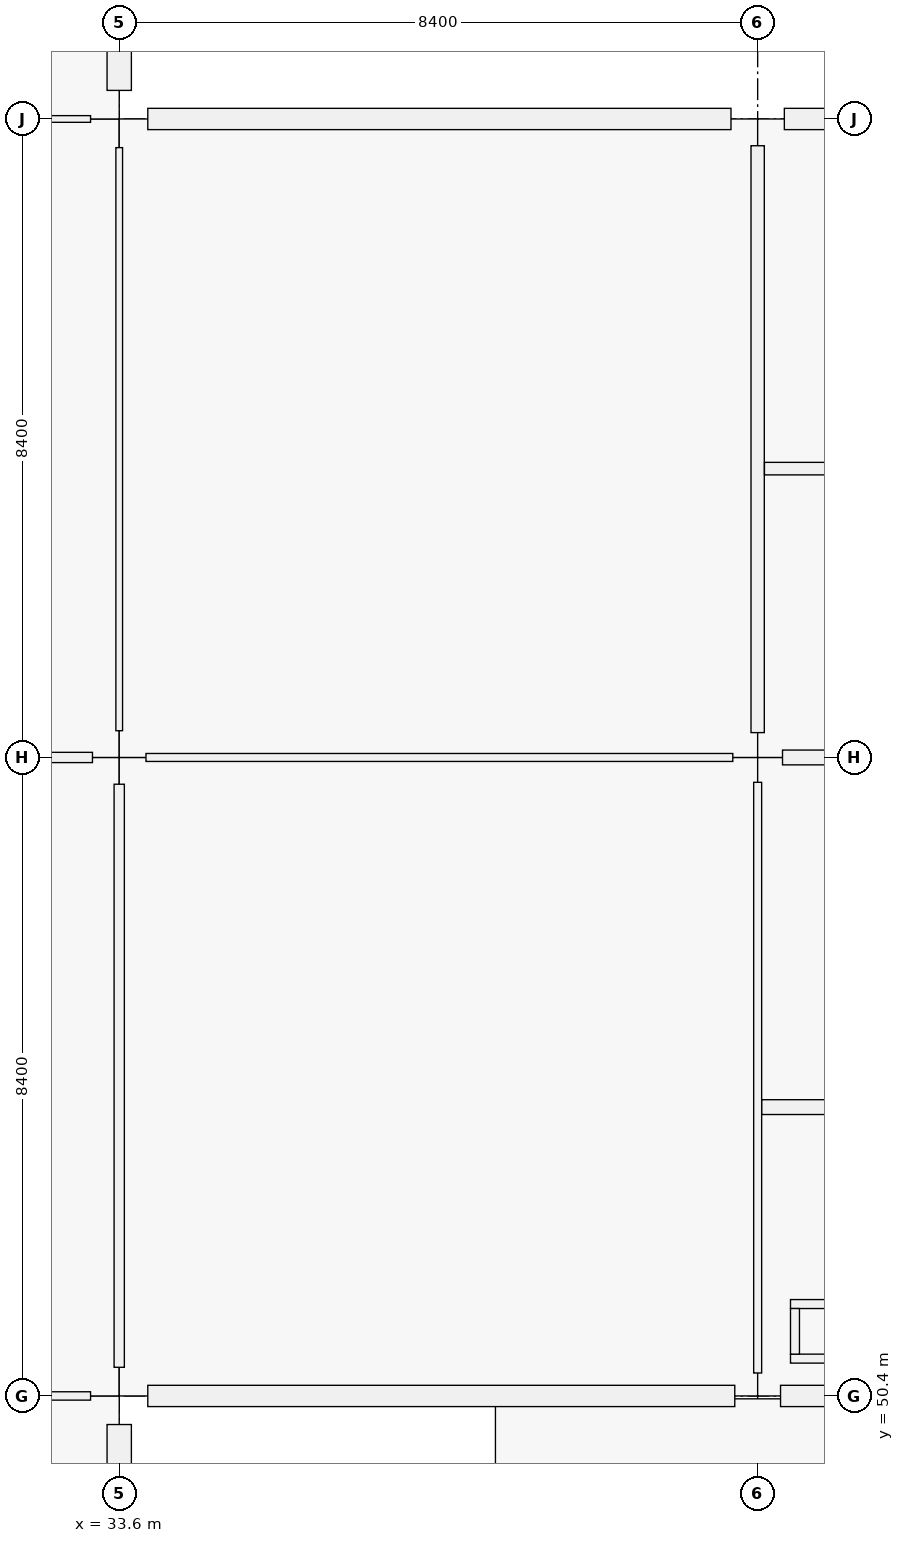
"""IFC4 building model, lengths in metres.
Left out: names, types, materials, properties, quantities, classifications, styles, units other than length and angle.
Written with IfcOpenShell. Run it as: python <this file> out.ifc"""

import sys

from ifc_helpers import new_model, si_unit, direction, frame, frame_2d, origin, origin_2d, place, context, subcontext, project, spatial, rectangle, extrude, element, fill, save


model = new_model("IFC4")
c1 = context("Model", 3, precision=1e-05, world=origin(), true_north=direction((0.0, 1.0)))
c2 = subcontext(c1, "Body", "Model", "MODEL_VIEW")
j1 = project(units=[si_unit("LENGTHUNIT", "METRE"), si_unit("PLANEANGLEUNIT", "RADIAN")], contexts=[c1])
p1 = place(None, origin())
s1 = spatial("IfcSite", under=j1, at=p1, CompositionType="ELEMENT")
p2 = place(p1, origin())
s2 = spatial("IfcBuilding", under=s1, at=p2, CompositionType="ELEMENT")
p3 = place(p2, frame((0.0, 0.0, 10.26)))
s3 = spatial("IfcBuildingStorey", under=s2, at=p3, CompositionType="ELEMENT", Elevation=10.26)
p4 = place(p3, frame((33.6, 50.4, 0.0), z_axis=(0.0, 0.0, 1.0), x_axis=(1.0, 0.0, 0.0)))
e1 = element("IfcColumn", 1, at=p4, inside=s3, PredefinedType="COLUMN", context=c2, shape_type="SweptSolid", body=[
    extrude(rectangle(XDim=0.75, YDim=0.75, at=origin_2d()), origin(), (0.0, 0.0, 1.0), 4.5),
])
p5 = place(p3, frame((33.6, 58.8, 0.0), z_axis=(0.0, 0.0, 1.0), x_axis=(1.0, 0.0, 0.0)))
e2 = element("IfcColumn", 2, at=p5, inside=s3, PredefinedType="COLUMN", context=c2, shape_type="SweptSolid", body=[
    extrude(rectangle(XDim=0.7, YDim=0.7, at=origin_2d()), origin(), (0.0, 0.0, 1.0), 4.5),
])
p6 = place(p3, frame((33.6, 67.2, 0.0), z_axis=(0.0, 0.0, 1.0), x_axis=(1.0, 0.0, 0.0)))
e3 = element("IfcColumn", 3, at=p6, inside=s3, PredefinedType="COLUMN", context=c2, shape_type="SweptSolid", body=[
    extrude(rectangle(XDim=0.75, YDim=0.75, at=origin_2d()), origin(), (0.0, 0.0, 1.0), 4.5),
])
p7 = place(p3, frame((42.0, 50.4, 0.0), z_axis=(0.0, 0.0, 1.0), x_axis=(1.0, 0.0, 0.0)))
e4 = element("IfcColumn", 4, at=p7, inside=s3, PredefinedType="COLUMN", context=c2, shape_type="SweptSolid", body=[
    extrude(rectangle(XDim=0.6, YDim=0.6, at=origin_2d()), origin(), (0.0, 0.0, 1.0), 4.5),
])
p8 = place(p3, frame((42.0, 58.8, 0.0), z_axis=(0.0, 0.0, 1.0), x_axis=(1.0, 0.0, 0.0)))
e5 = element("IfcColumn", 5, at=p8, inside=s3, PredefinedType="COLUMN", context=c2, shape_type="SweptSolid", body=[
    extrude(rectangle(XDim=0.65, YDim=0.65, at=origin_2d()), origin(), (0.0, 0.0, 1.0), 4.5),
])
p9 = place(p3, frame((42.0, 67.2, 0.0), z_axis=(0.0, 0.0, 1.0), x_axis=(1.0, 0.0, 0.0)))
e6 = element("IfcColumn", 6, at=p9, inside=s3, PredefinedType="COLUMN", context=c2, shape_type="SweptSolid", body=[
    extrude(rectangle(XDim=0.7, YDim=0.7, at=origin_2d()), origin(), (0.0, 0.0, 1.0), 4.5),
])
p10 = place(p3, frame((33.6, 50.024, 0.0), z_axis=(0.0, 0.0, 1.0), x_axis=(0.0, -1.0, 0.0)))
e7 = element("IfcWall", 7, at=p10, inside=s3, PredefinedType="SOLIDWALL", context=c2, shape_type="SweptSolid", body=[
    extrude(rectangle(XDim=7.673, YDim=0.32, at=frame_2d((3.836, 0.0))), origin(), (0.0, 0.0, 1.0), 3.54),
])
p11 = place(p10, frame((3.236, 0.0, 0.9)))
e8 = element("IfcOpeningElement", 8, at=p11, cuts=e7, PredefinedType="OPENING", context=c2, shape_type="SweptSolid", body=[
    extrude(rectangle(XDim=1.2, YDim=2.1, at=frame_2d((0.6, 1.05))), frame((0.0, 0.16, 0.0), z_axis=(0.0, -1.0, 0.0), x_axis=(1.0, 0.0, 0.0)), (0.0, 0.0, 1.0), 0.32),
])
p12 = place(p3, frame((33.6, 75.249, 0.0), z_axis=(0.0, 0.0, 1.0), x_axis=(0.0, -1.0, 0.0)))
e9 = element("IfcWall", 9, at=p12, inside=s3, PredefinedType="SOLIDWALL", context=c2, shape_type="SweptSolid", body=[
    extrude(rectangle(XDim=7.673, YDim=0.32, at=frame_2d((3.836, 0.0))), origin(), (0.0, 0.0, 1.0), 3.54),
])
p13 = place(p12, frame((2.486, 0.0, 0.9)))
e10 = element("IfcOpeningElement", 10, at=p13, cuts=e9, PredefinedType="OPENING", context=c2, shape_type="SweptSolid", body=[
    extrude(rectangle(XDim=2.7, YDim=1.2, at=frame_2d((1.35, 0.6))), frame((0.0, 0.16, 0.0), z_axis=(0.0, -1.0, 0.0), x_axis=(1.0, 0.0, 0.0)), (0.0, 0.0, 1.0), 0.32),
])
p14 = place(p3, frame((41.699, 50.4, 0.0), z_axis=(0.0, 0.0, 1.0), x_axis=(-1.0, 0.0, 0.0)))
e11 = element("IfcWall", 11, at=p14, inside=s3, PredefinedType="SOLIDWALL", context=c2, shape_type="SweptSolid", body=[
    extrude(rectangle(XDim=7.723, YDim=0.28, at=frame_2d((3.861, 0.0))), origin(), (0.0, 0.0, 1.0), 3.54),
])
p15 = place(p14, frame((2.761, 0.0, 0.9)))
e12 = element("IfcOpeningElement", 12, at=p15, cuts=e11, PredefinedType="OPENING", context=c2, shape_type="SweptSolid", body=[
    extrude(rectangle(XDim=2.2, YDim=1.35, at=frame_2d((1.1, 0.675))), frame((0.0, 0.14, 0.0), z_axis=(0.0, -1.0, 0.0), x_axis=(1.0, 0.0, 0.0)), (0.0, 0.0, 1.0), 0.28),
])
p16 = place(p3, frame((33.976, 67.2, 0.0), z_axis=(0.0, 0.0, 1.0), x_axis=(1.0, 0.0, 0.0)))
e13 = element("IfcWall", 13, at=p16, inside=s3, PredefinedType="SOLIDWALL", context=c2, shape_type="SweptSolid", body=[
    extrude(rectangle(XDim=7.673, YDim=0.28, at=frame_2d((3.836, 0.0))), origin(), (0.0, 0.0, 1.0), 3.54),
])
p17 = place(p16, frame((2.937, 0.0, 0.9)))
e14 = element("IfcOpeningElement", 14, at=p17, cuts=e13, PredefinedType="OPENING", context=c2, shape_type="SweptSolid", body=[
    extrude(rectangle(XDim=1.8, YDim=1.35, at=frame_2d((0.9, 0.675))), frame((0.0, 0.14, 0.0), z_axis=(0.0, -1.0, 0.0), x_axis=(1.0, 0.0, 0.0)), (0.0, 0.0, 1.0), 0.28),
])
p18 = place(p3, frame((50.074, 50.4, 0.0), z_axis=(0.0, 0.0, 1.0), x_axis=(-1.0, 0.0, 0.0)))
e15 = element("IfcWall", 15, at=p18, inside=s3, PredefinedType="SOLIDWALL", context=c2, shape_type="SweptSolid", body=[
    extrude(rectangle(XDim=7.773, YDim=0.28, at=frame_2d((3.886, 0.0))), origin(), (0.0, 0.0, 1.0), 3.54),
])
p19 = place(p18, frame((2.936, 0.0, 0.9)))
e16 = element("IfcOpeningElement", 16, at=p19, cuts=e15, PredefinedType="OPENING", context=c2, shape_type="SweptSolid", body=[
    extrude(rectangle(XDim=1.9, YDim=1.75, at=frame_2d((0.95, 0.875))), frame((0.0, 0.14, 0.0), z_axis=(0.0, -1.0, 0.0), x_axis=(1.0, 0.0, 0.0)), (0.0, 0.0, 1.0), 0.28),
])
p20 = place(p3, frame((42.351, 67.2, 0.0), z_axis=(0.0, 0.0, 1.0), x_axis=(1.0, 0.0, 0.0)))
e17 = element("IfcWall", 17, at=p20, inside=s3, PredefinedType="SOLIDWALL", context=c2, shape_type="SweptSolid", body=[
    extrude(rectangle(XDim=7.673, YDim=0.28, at=frame_2d((3.836, 0.0))), origin(), (0.0, 0.0, 1.0), 3.54),
])
p21 = place(p20, frame((3.136, 0.0, 0.9)))
e18 = element("IfcOpeningElement", 18, at=p21, cuts=e17, PredefinedType="OPENING", context=c2, shape_type="SweptSolid", body=[
    extrude(rectangle(XDim=1.4, YDim=1.75, at=frame_2d((0.7, 0.875))), frame((0.0, 0.14, 0.0), z_axis=(0.0, -1.0, 0.0), x_axis=(1.0, 0.0, 0.0)), (0.0, 0.0, 1.0), 0.28),
])
for number, where, z_axis, x_axis in (
    (19, (42.432, 50.891, 0.0), (0.0, 0.0, 1.0), (1.0, 0.0, 0.0)),
    (20, (42.432, 51.609, 0.0), (0.0, 0.0, 1.0), (1.0, 0.0, 0.0)),
):
    element("IfcWall", number, at=place(p3, frame(where, z_axis=z_axis, x_axis=x_axis)), inside=s3, PredefinedType="PARTITIONING", context=c2, shape_type="SweptSolid", body=[
        extrude(rectangle(XDim=1.036, YDim=0.118, at=frame_2d((0.518, 0.0))), origin(), (0.0, 0.0, 1.0), 3.53),
    ])
p22 = place(p3, frame((42.491, 50.95, 0.0), z_axis=(0.0, 0.0, 1.0), x_axis=(0.0, 1.0, 0.0)))
e21 = element("IfcWall", 21, at=p22, inside=s3, PredefinedType="PARTITIONING", context=c2, shape_type="SweptSolid", body=[
    extrude(rectangle(XDim=0.6, YDim=0.118, at=frame_2d((0.3, 0.0))), origin(), (0.0, 0.0, 1.0), 3.53),
])
p23 = place(p3, frame((25.552, 50.4, 0.0), z_axis=(0.0, 0.0, 1.0), x_axis=(1.0, 0.0, 0.0)))
e22 = element("IfcWall", 22, at=p23, inside=s3, PredefinedType="MOVABLE", context=c2, shape_type="SweptSolid", body=[
    extrude(rectangle(XDim=7.671, YDim=0.11, at=frame_2d((3.835, 0.0))), origin(), (0.0, 0.0, 1.0), 3.37),
])
p24 = place(p23, frame((3.296, 0.0, 0.0)))
e23 = element("IfcOpeningElement", 23, at=p24, cuts=e22, PredefinedType="OPENING", context=c2, shape_type="SweptSolid", body=[
    extrude(rectangle(XDim=1.08, YDim=2.25, at=frame_2d((0.54, 1.125))), frame((0.0, 0.055, 0.0), z_axis=(0.0, -1.0, 0.0), x_axis=(1.0, 0.0, 0.0)), (0.0, 0.0, 1.0), 0.11),
])
p25 = place(p3, frame((25.577, 58.8, 0.0), z_axis=(0.0, 0.0, 1.0), x_axis=(1.0, 0.0, 0.0)))
e24 = element("IfcWall", 24, at=p25, inside=s3, PredefinedType="PARTITIONING", context=c2, shape_type="SweptSolid", body=[
    extrude(rectangle(XDim=7.671, YDim=0.135, at=frame_2d((3.835, 0.0))), origin(), (0.0, 0.0, 1.0), 3.37),
])
p26 = place(p25, frame((3.306, 0.0, 0.0)))
e25 = element("IfcOpeningElement", 25, at=p26, cuts=e24, PredefinedType="OPENING", context=c2, shape_type="SweptSolid", body=[
    extrude(rectangle(XDim=1.06, YDim=2.25, at=frame_2d((0.53, 1.125))), frame((0.0, 0.067, 0.0), z_axis=(0.0, -1.0, 0.0), x_axis=(1.0, 0.0, 0.0)), (0.0, 0.0, 1.0), 0.135),
])
p27 = place(p3, frame((25.552, 67.2, 0.0), z_axis=(0.0, 0.0, 1.0), x_axis=(1.0, 0.0, 0.0)))
e26 = element("IfcWall", 26, at=p27, inside=s3, PredefinedType="PARTITIONING", context=c2, shape_type="SweptSolid", body=[
    extrude(rectangle(XDim=7.671, YDim=0.088, at=frame_2d((3.835, 0.0))), origin(), (0.0, 0.0, 1.0), 3.37),
])
p28 = place(p27, frame((3.316, 0.0, 0.0)))
e27 = element("IfcOpeningElement", 27, at=p28, cuts=e26, PredefinedType="OPENING", context=c2, shape_type="SweptSolid", body=[
    extrude(rectangle(XDim=1.04, YDim=2.2, at=frame_2d((0.52, 1.1))), frame((0.0, 0.044, 0.0), z_axis=(0.0, -1.0, 0.0), x_axis=(1.0, 0.0, 0.0)), (0.0, 0.0, 1.0), 0.088),
])
p29 = place(p3, frame((33.952, 58.8, 0.0), z_axis=(0.0, 0.0, 1.0), x_axis=(1.0, 0.0, 0.0)))
e28 = element("IfcWall", 28, at=p29, inside=s3, PredefinedType="PARTITIONING", context=c2, shape_type="SweptSolid", body=[
    extrude(rectangle(XDim=7.721, YDim=0.105, at=frame_2d((3.861, 0.0))), origin(), (0.0, 0.0, 1.0), 3.37),
])
p30 = place(p29, frame((3.351, 0.0, 0.0)))
e29 = element("IfcOpeningElement", 29, at=p30, cuts=e28, PredefinedType="OPENING", context=c2, shape_type="SweptSolid", body=[
    extrude(rectangle(XDim=1.02, YDim=2.2, at=frame_2d((0.51, 1.1))), frame((0.0, 0.052, 0.0), z_axis=(0.0, -1.0, 0.0), x_axis=(1.0, 0.0, 0.0)), (0.0, 0.0, 1.0), 0.105),
])
p31 = place(p3, frame((42.327, 58.8, 0.0), z_axis=(0.0, 0.0, 1.0), x_axis=(1.0, 0.0, 0.0)))
e30 = element("IfcWall", 30, at=p31, inside=s3, PredefinedType="PARTITIONING", context=c2, shape_type="SweptSolid", body=[
    extrude(rectangle(XDim=7.771, YDim=0.195, at=frame_2d((3.885, 0.0))), origin(), (0.0, 0.0, 1.0), 3.37),
])
p32 = place(p3, frame((33.6, 50.777, 0.0), z_axis=(0.0, 0.0, 1.0), x_axis=(0.0, 1.0, 0.0)))
e31 = element("IfcWall", 31, at=p32, inside=s3, PredefinedType="PARTITIONING", context=c2, shape_type="SweptSolid", body=[
    extrude(rectangle(XDim=7.671, YDim=0.135, at=frame_2d((3.835, 0.0))), origin(), (0.0, 0.0, 1.0), 3.37),
])
p33 = place(p32, frame((3.336, 0.0, 0.0)))
e32 = element("IfcOpeningElement", 32, at=p33, cuts=e31, PredefinedType="OPENING", context=c2, shape_type="SweptSolid", body=[
    extrude(rectangle(XDim=1.0, YDim=2.2, at=frame_2d((0.5, 1.1))), frame((0.0, 0.067, 0.0), z_axis=(0.0, -1.0, 0.0), x_axis=(1.0, 0.0, 0.0)), (0.0, 0.0, 1.0), 0.135),
])
p34 = place(p3, frame((33.6, 59.152, 0.0), z_axis=(0.0, 0.0, 1.0), x_axis=(0.0, 1.0, 0.0)))
e33 = element("IfcWall", 33, at=p34, inside=s3, PredefinedType="PARTITIONING", context=c2, shape_type="SweptSolid", body=[
    extrude(rectangle(XDim=7.671, YDim=0.088, at=frame_2d((3.835, 0.0))), origin(), (0.0, 0.0, 1.0), 3.37),
])
p35 = place(p34, frame((3.365, 0.0, 0.0)))
e34 = element("IfcOpeningElement", 34, at=p35, cuts=e33, PredefinedType="OPENING", context=c2, shape_type="SweptSolid", body=[
    extrude(rectangle(XDim=0.94, YDim=2.15, at=frame_2d((0.47, 1.075))), frame((0.0, 0.044, 0.0), z_axis=(0.0, -1.0, 0.0), x_axis=(1.0, 0.0, 0.0)), (0.0, 0.0, 1.0), 0.088),
])
p36 = place(p3, frame((42.0, 50.702, 0.0), z_axis=(0.0, 0.0, 1.0), x_axis=(0.0, 1.0, 0.0)))
e35 = element("IfcWall", 35, at=p36, inside=s3, PredefinedType="PARTITIONING", context=c2, shape_type="SweptSolid", body=[
    extrude(rectangle(XDim=7.771, YDim=0.105, at=frame_2d((3.885, 0.0))), origin(), (0.0, 0.0, 1.0), 3.37),
])
p37 = place(p3, frame((42.0, 59.127, 0.0), z_axis=(0.0, 0.0, 1.0), x_axis=(0.0, 1.0, 0.0)))
e36 = element("IfcWall", 36, at=p37, inside=s3, PredefinedType="PARTITIONING", context=c2, shape_type="SweptSolid", body=[
    extrude(rectangle(XDim=7.721, YDim=0.175, at=frame_2d((3.86, 0.0))), origin(), (0.0, 0.0, 1.0), 3.37),
])
p38 = place(p3, frame((42.054, 54.2, 0.0), z_axis=(0.0, 0.0, 1.0), x_axis=(1.0, 0.0, 0.0)))
e37 = element("IfcWall", 37, at=p38, inside=s3, PredefinedType="PARTITIONING", context=c2, shape_type="SweptSolid", body=[
    extrude(rectangle(XDim=8.246, YDim=0.195, at=frame_2d((4.123, 0.0))), origin(), (0.0, 0.0, 1.0), 3.37),
])
p39 = place(p3, frame((42.09, 62.6, 0.0), z_axis=(0.0, 0.0, 1.0), x_axis=(1.0, 0.0, 0.0)))
e38 = element("IfcWall", 38, at=p39, inside=s3, PredefinedType="PARTITIONING", context=c2, shape_type="SweptSolid", body=[
    extrude(rectangle(XDim=8.236, YDim=0.165, at=frame_2d((4.118, 0.0))), origin(), (0.0, 0.0, 1.0), 3.37),
])
p40 = place(p15, origin())
e39 = element("IfcWindow", 39, at=p40, inside=s3, PartitioningType="SINGLE_PANEL", PredefinedType="WINDOW", context=c2, shape_type="SweptSolid", body=[
    extrude(rectangle(XDim=2.2, YDim=1.35, at=frame_2d((1.1, 0.675))), frame((0.0, 0.03, 0.0), z_axis=(0.0, -1.0, 0.0), x_axis=(1.0, 0.0, 0.0)), (0.0, 0.0, 1.0), 0.06),
])
fill(e12, e39)
p41 = place(p17, origin())
e40 = element("IfcWindow", 40, at=p41, inside=s3, PartitioningType="SINGLE_PANEL", PredefinedType="WINDOW", context=c2, shape_type="SweptSolid", body=[
    extrude(rectangle(XDim=1.8, YDim=1.35, at=frame_2d((0.9, 0.675))), frame((0.0, 0.03, 0.0), z_axis=(0.0, -1.0, 0.0), x_axis=(1.0, 0.0, 0.0)), (0.0, 0.0, 1.0), 0.06),
])
fill(e14, e40)
p42 = place(p30, origin())
e41 = element("IfcDoor", 41, at=p42, inside=s3, OperationType="SINGLE_SWING_LEFT", PredefinedType="DOOR", context=c2, shape_type="SweptSolid", body=[
    extrude(rectangle(XDim=1.02, YDim=2.2, at=frame_2d((0.51, 1.1))), frame((0.0, 0.025, 0.0), z_axis=(0.0, -1.0, 0.0), x_axis=(1.0, 0.0, 0.0)), (0.0, 0.0, 1.0), 0.05),
])
fill(e29, e41)
p43 = place(p33, origin())
e42 = element("IfcDoor", 42, at=p43, inside=s3, OperationType="SINGLE_SWING_LEFT", PredefinedType="DOOR", context=c2, shape_type="SweptSolid", body=[
    extrude(rectangle(XDim=1.0, YDim=2.2, at=frame_2d((0.5, 1.1))), frame((0.0, 0.025, 0.0), z_axis=(0.0, -1.0, 0.0), x_axis=(1.0, 0.0, 0.0)), (0.0, 0.0, 1.0), 0.05),
])
fill(e32, e42)
p44 = place(p35, origin())
e43 = element("IfcDoor", 43, at=p44, inside=s3, OperationType="SINGLE_SWING_LEFT", PredefinedType="DOOR", context=c2, shape_type="SweptSolid", body=[
    extrude(rectangle(XDim=0.94, YDim=2.15, at=frame_2d((0.47, 1.075))), frame((0.0, 0.025, 0.0), z_axis=(0.0, -1.0, 0.0), x_axis=(1.0, 0.0, 0.0)), (0.0, 0.0, 1.0), 0.05),
])
fill(e34, e43)
save(model, sys.argv[1])
